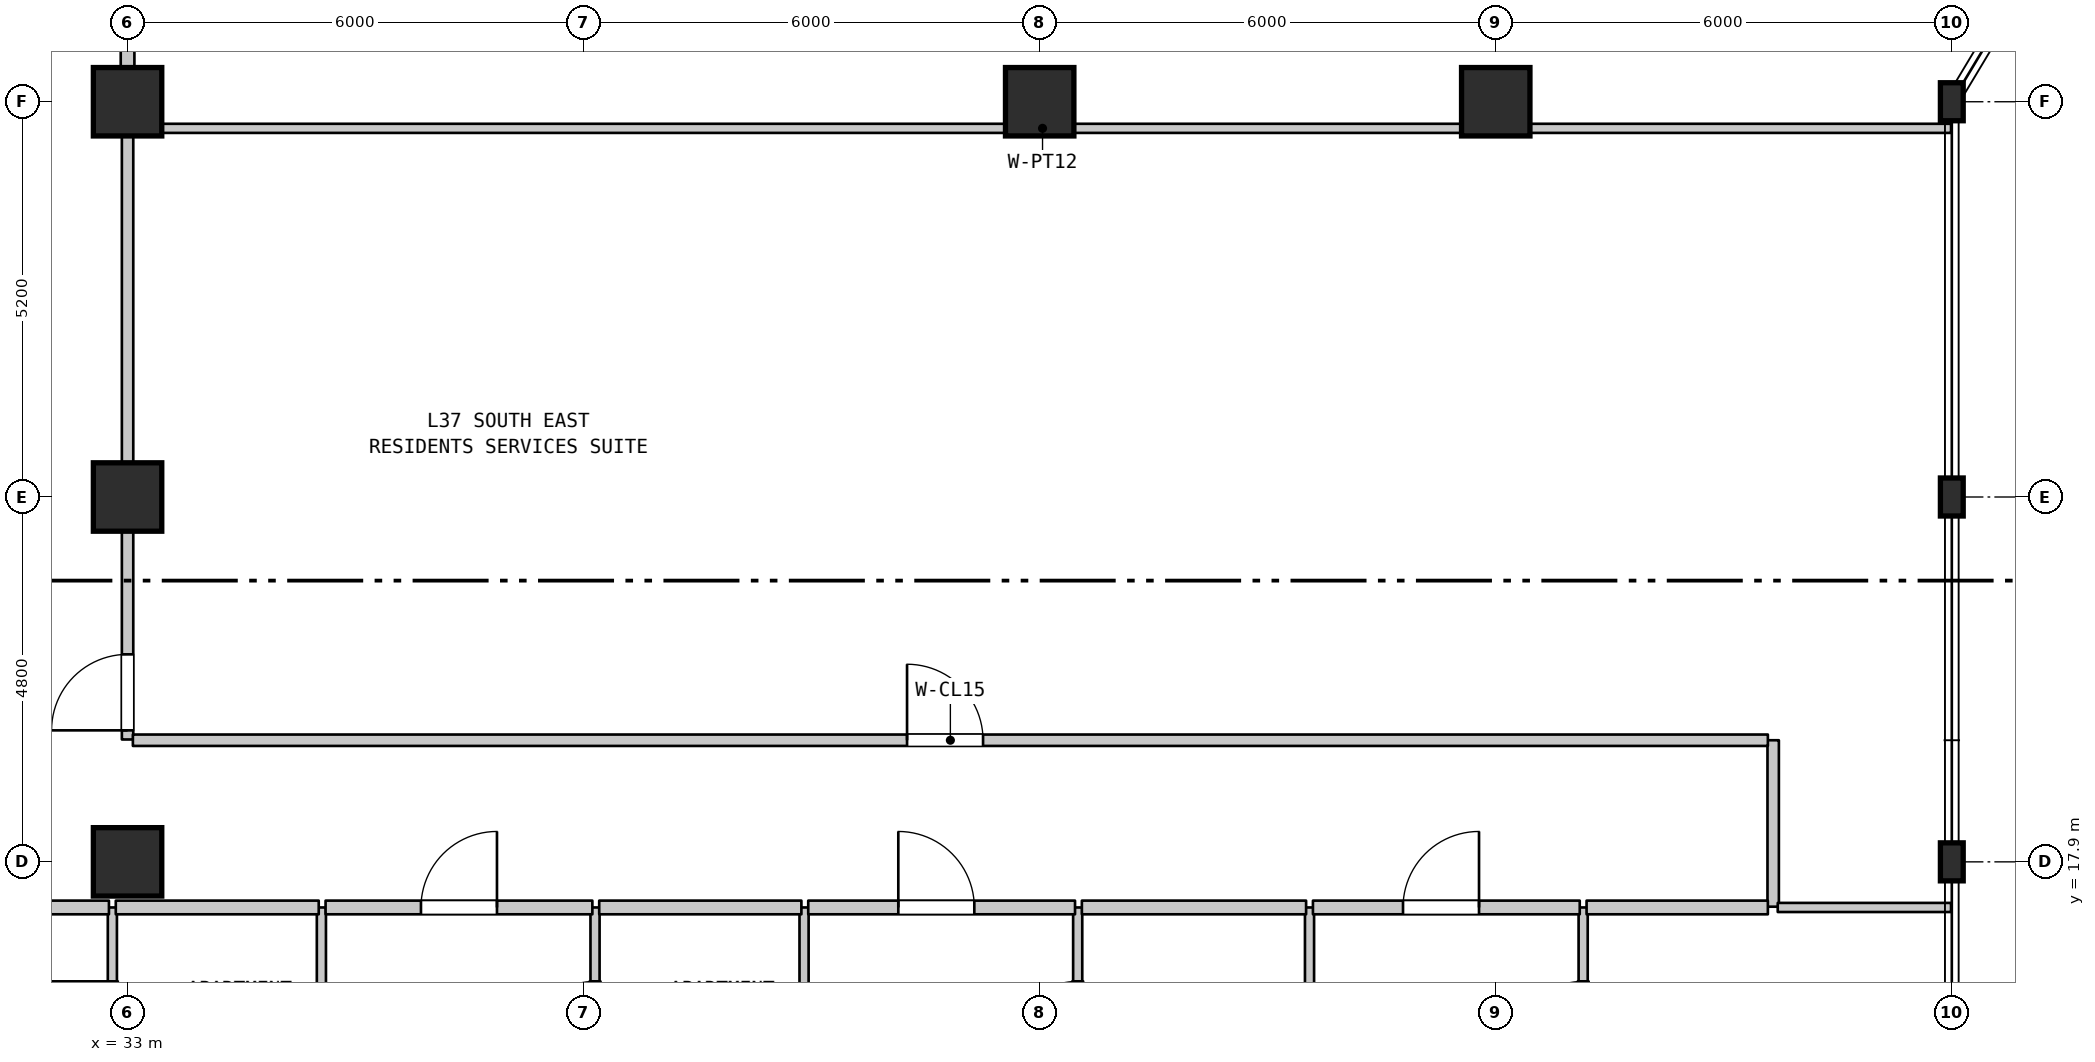
"""IFC4 building model, lengths in metres.
Left out: names, types, materials, properties, quantities, classifications, styles, units other than length and angle.
Written with IfcOpenShell. Run it as: python <this file> out.ifc"""

import sys

from ifc_helpers import new_model, si_unit, direction, frame, frame_2d, origin, origin_2d, place, context, subcontext, project, spatial, rectangle, i_section, extrude, element, fill, save


model = new_model("IFC4")
c1 = context("Model", 3, precision=1e-05, world=origin(), true_north=direction((0.0, 1.0)))
c2 = subcontext(c1, "Body", "Model", "MODEL_VIEW")
j1 = project(units=[si_unit("LENGTHUNIT", "METRE"), si_unit("PLANEANGLEUNIT", "RADIAN")], contexts=[c1])
p1 = place(None, origin())
s1 = spatial("IfcSite", under=j1, at=p1, CompositionType="ELEMENT")
p2 = place(p1, origin())
s2 = spatial("IfcBuilding", under=s1, at=p2, CompositionType="ELEMENT")
p3 = place(p2, frame((0.0, 0.0, 152.0)))
s3 = spatial("IfcBuildingStorey", under=s2, at=p3, CompositionType="ELEMENT", Elevation=152.0)
for number, where, z_axis, x_axis in (
    (1, (33.0, 17.9, 0.0), (0.0, 0.0, 1.0), (1.0, 0.0, 0.0)),
    (2, (33.0, 22.7, 0.0), (0.0, 0.0, 1.0), (1.0, 0.0, 0.0)),
    (3, (33.0, 27.9, 0.0), (0.0, 0.0, 1.0), (1.0, 0.0, 0.0)),
    (4, (45.0, 27.9, 0.0), (0.0, 0.0, 1.0), (1.0, 0.0, 0.0)),
    (5, (51.0, 27.9, 0.0), (0.0, 0.0, 1.0), (1.0, 0.0, 0.0)),
):
    element("IfcColumn", number, at=place(p3, frame(where, z_axis=z_axis, x_axis=x_axis)), inside=s3, PredefinedType="COLUMN", context=c2, shape_type="SweptSolid", body=[
        extrude(rectangle(XDim=0.9, YDim=0.9, at=origin_2d()), origin(), (0.0, 0.0, 1.0), 3.7),
    ])
for number, where, z_axis, x_axis in (
    (6, (57.0, 17.9, 0.0), (0.0, 0.0, 1.0), (1.0, 0.0, 0.0)),
    (7, (57.0, 22.7, 0.0), (0.0, 0.0, 1.0), (1.0, 0.0, 0.0)),
    (8, (57.0, 27.9, 0.0), (0.0, 0.0, 1.0), (1.0, 0.0, 0.0)),
):
    element("IfcColumn", number, at=place(p3, frame(where, z_axis=z_axis, x_axis=x_axis)), inside=s3, PredefinedType="COLUMN", context=c2, shape_type="SweptSolid", body=[
        extrude(i_section(OverallWidth=0.3, OverallDepth=0.5, WebThickness=0.014, FlangeThickness=0.028, FilletRadius=0.027, at=origin_2d()), origin(), (0.0, 0.0, 1.0), 3.7),
    ])
p4 = place(p3, frame((32.8, 14.6, 0.0), z_axis=(0.0, 0.0, 1.0), x_axis=(0.0, 1.0, 0.0)))
e9 = element("IfcWall", 9, at=p4, inside=s3, PredefinedType="PARTITIONING", context=c2, shape_type="SweptSolid", body=[
    extrude(rectangle(XDim=2.7, YDim=0.12, at=frame_2d((1.35, 0.0))), origin(), (0.0, 0.0, 1.0), 3.385),
])
p5 = place(p4, frame((0.828, 0.0, 0.0)))
e10 = element("IfcOpeningElement", 10, at=p5, cuts=e9, PredefinedType="OPENING", context=c2, shape_type="SweptSolid", body=[
    extrude(rectangle(XDim=0.9, YDim=2.1, at=frame_2d((0.45, 1.05))), frame((0.0, 0.07, 0.0), z_axis=(0.0, -1.0, 0.0), x_axis=(1.0, 0.0, 0.0)), (0.0, 0.0, 1.0), 0.14),
])
p6 = place(p3, frame((33.0, 19.51, 0.0), z_axis=(0.0, 0.0, 1.0), x_axis=(0.0, 1.0, 0.0)))
e11 = element("IfcWall", 11, at=p6, inside=s3, PredefinedType="STANDARD", context=c2, shape_type="SweptSolid", body=[
    extrude(rectangle(XDim=8.04, YDim=0.15, at=frame_2d((4.02, 0.0))), origin(), (0.0, 0.0, 1.0), 2.935),
])
p7 = place(p6, frame((0.12, 0.0, 0.0)))
e12 = element("IfcOpeningElement", 12, at=p7, cuts=e11, PredefinedType="OPENING", context=c2, shape_type="SweptSolid", body=[
    extrude(rectangle(XDim=1.0, YDim=2.15, at=frame_2d((0.5, 1.075))), frame((0.0, 0.085, 0.0), z_axis=(0.0, -1.0, 0.0), x_axis=(1.0, 0.0, 0.0)), (0.0, 0.0, 1.0), 0.17),
])
p8 = place(p3, frame((33.0, 27.56, 0.0), z_axis=(0.0, 0.0, 1.0), x_axis=(0.0, 1.0, 0.0)))
e13 = element("IfcWall", 13, at=p8, inside=s3, PredefinedType="STANDARD", context=c2, shape_type="SweptSolid", body=[
    extrude(rectangle(XDim=2.6, YDim=0.18, at=frame_2d((1.3, 0.0))), origin(), (0.0, 0.0, 1.0), 2.885),
])
p9 = place(p8, frame((1.03, 0.0, 0.0)))
e14 = element("IfcOpeningElement", 14, at=p9, cuts=e13, PredefinedType="OPENING", context=c2, shape_type="SweptSolid", body=[
    extrude(rectangle(XDim=1.0, YDim=2.15, at=frame_2d((0.5, 1.075))), frame((0.0, 0.1, 0.0), z_axis=(0.0, -1.0, 0.0), x_axis=(1.0, 0.0, 0.0)), (0.0, 0.0, 1.0), 0.2),
])
p10 = place(p3, frame((35.55, 14.6, 0.0), z_axis=(0.0, 0.0, 1.0), x_axis=(0.0, 1.0, 0.0)))
e15 = element("IfcWall", 15, at=p10, inside=s3, PredefinedType="PARTITIONING", context=c2, shape_type="SweptSolid", body=[
    extrude(rectangle(XDim=2.7, YDim=0.12, at=frame_2d((1.35, 0.0))), origin(), (0.0, 0.0, 1.0), 3.385),
])
p11 = place(p3, frame((39.15, 14.6, 0.0), z_axis=(0.0, 0.0, 1.0), x_axis=(0.0, 1.0, 0.0)))
e16 = element("IfcWall", 16, at=p11, inside=s3, PredefinedType="PARTITIONING", context=c2, shape_type="SweptSolid", body=[
    extrude(rectangle(XDim=2.7, YDim=0.12, at=frame_2d((1.35, 0.0))), origin(), (0.0, 0.0, 1.0), 3.385),
])
p12 = place(p11, frame((0.828, 0.0, 0.0)))
e17 = element("IfcOpeningElement", 17, at=p12, cuts=e16, PredefinedType="OPENING", context=c2, shape_type="SweptSolid", body=[
    extrude(rectangle(XDim=0.9, YDim=2.1, at=frame_2d((0.45, 1.05))), frame((0.0, 0.07, 0.0), z_axis=(0.0, -1.0, 0.0), x_axis=(1.0, 0.0, 0.0)), (0.0, 0.0, 1.0), 0.14),
])
p13 = place(p3, frame((41.9, 14.6, 0.0), z_axis=(0.0, 0.0, 1.0), x_axis=(0.0, 1.0, 0.0)))
e18 = element("IfcWall", 18, at=p13, inside=s3, PredefinedType="PARTITIONING", context=c2, shape_type="SweptSolid", body=[
    extrude(rectangle(XDim=2.7, YDim=0.12, at=frame_2d((1.35, 0.0))), origin(), (0.0, 0.0, 1.0), 3.385),
])
p14 = place(p3, frame((45.5, 14.6, 0.0), z_axis=(0.0, 0.0, 1.0), x_axis=(0.0, 1.0, 0.0)))
e19 = element("IfcWall", 19, at=p14, inside=s3, PredefinedType="PARTITIONING", context=c2, shape_type="SweptSolid", body=[
    extrude(rectangle(XDim=2.7, YDim=0.12, at=frame_2d((1.35, 0.0))), origin(), (0.0, 0.0, 1.0), 3.385),
])
p15 = place(p14, frame((0.828, 0.0, 0.0)))
e20 = element("IfcOpeningElement", 20, at=p15, cuts=e19, PredefinedType="OPENING", context=c2, shape_type="SweptSolid", body=[
    extrude(rectangle(XDim=0.9, YDim=2.1, at=frame_2d((0.45, 1.05))), frame((0.0, 0.07, 0.0), z_axis=(0.0, -1.0, 0.0), x_axis=(1.0, 0.0, 0.0)), (0.0, 0.0, 1.0), 0.14),
])
p16 = place(p3, frame((48.55, 14.6, 0.0), z_axis=(0.0, 0.0, 1.0), x_axis=(0.0, 1.0, 0.0)))
e21 = element("IfcWall", 21, at=p16, inside=s3, PredefinedType="PARTITIONING", context=c2, shape_type="SweptSolid", body=[
    extrude(rectangle(XDim=2.7, YDim=0.12, at=frame_2d((1.35, 0.0))), origin(), (0.0, 0.0, 1.0), 3.385),
])
p17 = place(p3, frame((52.15, 14.6, 0.0), z_axis=(0.0, 0.0, 1.0), x_axis=(0.0, 1.0, 0.0)))
e22 = element("IfcWall", 22, at=p17, inside=s3, PredefinedType="PARTITIONING", context=c2, shape_type="SweptSolid", body=[
    extrude(rectangle(XDim=2.7, YDim=0.12, at=frame_2d((1.35, 0.0))), origin(), (0.0, 0.0, 1.0), 3.385),
])
p18 = place(p17, frame((0.828, 0.0, 0.0)))
e23 = element("IfcOpeningElement", 23, at=p18, cuts=e22, PredefinedType="OPENING", context=c2, shape_type="SweptSolid", body=[
    extrude(rectangle(XDim=0.9, YDim=2.1, at=frame_2d((0.45, 1.05))), frame((0.0, 0.07, 0.0), z_axis=(0.0, -1.0, 0.0), x_axis=(1.0, 0.0, 0.0)), (0.0, 0.0, 1.0), 0.14),
])
p19 = place(p3, frame((54.65, 17.31, 0.0), z_axis=(0.0, 0.0, 1.0), x_axis=(0.0, 1.0, 0.0)))
e24 = element("IfcWall", 24, at=p19, inside=s3, PredefinedType="STANDARD", context=c2, shape_type="SweptSolid", body=[
    extrude(rectangle(XDim=2.19, YDim=0.15, at=frame_2d((1.095, 0.0))), origin(), (0.0, 0.0, 1.0), 3.385),
])
p20 = place(p3, frame((29.245, 17.3, 0.0), z_axis=(0.0, 0.0, 1.0), x_axis=(1.0, 0.0, 0.0)))
e25 = element("IfcWall", 25, at=p20, inside=s3, PredefinedType="STANDARD", context=c2, shape_type="SweptSolid", body=[
    extrude(rectangle(XDim=3.51, YDim=0.18, at=frame_2d((1.755, 0.0))), origin(), (0.0, 0.0, 1.0), 3.385),
])
p21 = place(p20, frame((1.255, 0.0, 0.0)))
e26 = element("IfcOpeningElement", 26, at=p21, cuts=e25, PredefinedType="OPENING", context=c2, shape_type="SweptSolid", body=[
    extrude(rectangle(XDim=1.0, YDim=2.15, at=frame_2d((0.5, 1.075))), frame((0.0, 0.1, 0.0), z_axis=(0.0, -1.0, 0.0), x_axis=(1.0, 0.0, 0.0)), (0.0, 0.0, 1.0), 0.2),
])
p22 = place(p3, frame((32.845, 17.3, 0.0), z_axis=(0.0, 0.0, 1.0), x_axis=(1.0, 0.0, 0.0)))
e27 = element("IfcWall", 27, at=p22, inside=s3, PredefinedType="STANDARD", context=c2, shape_type="SweptSolid", body=[
    extrude(rectangle(XDim=2.67, YDim=0.18, at=frame_2d((1.335, 0.0))), origin(), (0.0, 0.0, 1.0), 3.385),
])
p23 = place(p3, frame((35.605, 17.3, 0.0), z_axis=(0.0, 0.0, 1.0), x_axis=(1.0, 0.0, 0.0)))
e28 = element("IfcWall", 28, at=p23, inside=s3, PredefinedType="STANDARD", context=c2, shape_type="SweptSolid", body=[
    extrude(rectangle(XDim=3.51, YDim=0.18, at=frame_2d((1.755, 0.0))), origin(), (0.0, 0.0, 1.0), 3.385),
])
p24 = place(p23, frame((1.255, 0.0, 0.0)))
e29 = element("IfcOpeningElement", 29, at=p24, cuts=e28, PredefinedType="OPENING", context=c2, shape_type="SweptSolid", body=[
    extrude(rectangle(XDim=1.0, YDim=2.15, at=frame_2d((0.5, 1.075))), frame((0.0, 0.1, 0.0), z_axis=(0.0, -1.0, 0.0), x_axis=(1.0, 0.0, 0.0)), (0.0, 0.0, 1.0), 0.2),
])
p25 = place(p3, frame((39.205, 17.3, 0.0), z_axis=(0.0, 0.0, 1.0), x_axis=(1.0, 0.0, 0.0)))
e30 = element("IfcWall", 30, at=p25, inside=s3, PredefinedType="STANDARD", context=c2, shape_type="SweptSolid", body=[
    extrude(rectangle(XDim=2.66, YDim=0.18, at=frame_2d((1.33, 0.0))), origin(), (0.0, 0.0, 1.0), 3.385),
])
p26 = place(p3, frame((41.955, 17.3, 0.0), z_axis=(0.0, 0.0, 1.0), x_axis=(1.0, 0.0, 0.0)))
e31 = element("IfcWall", 31, at=p26, inside=s3, PredefinedType="STANDARD", context=c2, shape_type="SweptSolid", body=[
    extrude(rectangle(XDim=3.51, YDim=0.18, at=frame_2d((1.755, 0.0))), origin(), (0.0, 0.0, 1.0), 3.385),
])
p27 = place(p26, frame((1.185, 0.0, 0.0)))
e32 = element("IfcOpeningElement", 32, at=p27, cuts=e31, PredefinedType="OPENING", context=c2, shape_type="SweptSolid", body=[
    extrude(rectangle(XDim=1.0, YDim=2.15, at=frame_2d((0.5, 1.075))), frame((0.0, 0.1, 0.0), z_axis=(0.0, -1.0, 0.0), x_axis=(1.0, 0.0, 0.0)), (0.0, 0.0, 1.0), 0.2),
])
p28 = place(p3, frame((45.555, 17.3, 0.0), z_axis=(0.0, 0.0, 1.0), x_axis=(1.0, 0.0, 0.0)))
e33 = element("IfcWall", 33, at=p28, inside=s3, PredefinedType="STANDARD", context=c2, shape_type="SweptSolid", body=[
    extrude(rectangle(XDim=2.95, YDim=0.18, at=frame_2d((1.475, 0.0))), origin(), (0.0, 0.0, 1.0), 3.385),
])
p29 = place(p3, frame((48.595, 17.3, 0.0), z_axis=(0.0, 0.0, 1.0), x_axis=(1.0, 0.0, 0.0)))
e34 = element("IfcWall", 34, at=p29, inside=s3, PredefinedType="STANDARD", context=c2, shape_type="SweptSolid", body=[
    extrude(rectangle(XDim=3.51, YDim=0.18, at=frame_2d((1.755, 0.0))), origin(), (0.0, 0.0, 1.0), 3.385),
])
p30 = place(p29, frame((1.185, 0.0, 0.0)))
e35 = element("IfcOpeningElement", 35, at=p30, cuts=e34, PredefinedType="OPENING", context=c2, shape_type="SweptSolid", body=[
    extrude(rectangle(XDim=1.0, YDim=2.15, at=frame_2d((0.5, 1.075))), frame((0.0, 0.1, 0.0), z_axis=(0.0, -1.0, 0.0), x_axis=(1.0, 0.0, 0.0)), (0.0, 0.0, 1.0), 0.2),
])
p31 = place(p3, frame((52.195, 17.3, 0.0), z_axis=(0.0, 0.0, 1.0), x_axis=(1.0, 0.0, 0.0)))
e36 = element("IfcWall", 36, at=p31, inside=s3, PredefinedType="STANDARD", context=c2, shape_type="SweptSolid", body=[
    extrude(rectangle(XDim=2.385, YDim=0.18, at=frame_2d((1.192, 0.0))), origin(), (0.0, 0.0, 1.0), 3.385),
])
p32 = place(p3, frame((54.71, 17.3, 0.0), z_axis=(0.0, 0.0, 1.0), x_axis=(1.0, 0.0, 0.0)))
e37 = element("IfcWall", 37, at=p32, inside=s3, PredefinedType="PARTITIONING", context=c2, shape_type="SweptSolid", body=[
    extrude(rectangle(XDim=2.28, YDim=0.12, at=frame_2d((1.14, 0.0))), origin(), (0.0, 0.0, 1.0), 3.385),
])
p33 = place(p3, frame((33.07, 19.5, 0.0), z_axis=(0.0, 0.0, 1.0), x_axis=(1.0, 0.0, 0.0)))
e38 = element("IfcWall", 38, at=p33, inside=s3, PredefinedType="STANDARD", context=c2, shape_type="SweptSolid", body=[
    extrude(rectangle(XDim=21.51, YDim=0.15, at=frame_2d((10.755, 0.0))), origin(), (0.0, 0.0, 1.0), 3.385),
])
p34 = place(p33, frame((10.185, 0.0, 0.0)))
e39 = element("IfcOpeningElement", 39, at=p34, cuts=e38, PredefinedType="OPENING", context=c2, shape_type="SweptSolid", body=[
    extrude(rectangle(XDim=1.0, YDim=2.15, at=frame_2d((0.5, 1.075))), frame((0.0, 0.085, 0.0), z_axis=(0.0, -1.0, 0.0), x_axis=(1.0, 0.0, 0.0)), (0.0, 0.0, 1.0), 0.17),
])
p35 = place(p3, frame((33.085, 27.55, 0.0), z_axis=(0.0, 0.0, 1.0), x_axis=(1.0, 0.0, 0.0)))
e40 = element("IfcWall", 40, at=p35, inside=s3, PredefinedType="PARTITIONING", context=c2, shape_type="SweptSolid", body=[
    extrude(rectangle(XDim=23.905, YDim=0.12, at=frame_2d((11.953, 0.0))), origin(), (0.0, 0.0, 1.0), 3.385),
])
p36 = place(p5, origin())
e41 = element("IfcDoor", 41, at=p36, inside=s3, OperationType="SINGLE_SWING_RIGHT", PredefinedType="DOOR", context=c2, shape_type="SweptSolid", body=[
    extrude(rectangle(XDim=0.9, YDim=2.1, at=frame_2d((0.45, 1.05))), frame((0.0, 0.025, 0.0), z_axis=(0.0, -1.0, 0.0), x_axis=(1.0, 0.0, 0.0)), (0.0, 0.0, 1.0), 0.05),
])
fill(e10, e41)
p37 = place(p7, origin())
e42 = element("IfcDoor", 42, at=p37, inside=s3, OperationType="SINGLE_SWING_LEFT", PredefinedType="DOOR", context=c2, shape_type="SweptSolid", body=[
    extrude(rectangle(XDim=1.0, YDim=2.15, at=frame_2d((0.5, 1.075))), frame((0.0, 0.025, 0.0), z_axis=(0.0, -1.0, 0.0), x_axis=(1.0, 0.0, 0.0)), (0.0, 0.0, 1.0), 0.05),
])
fill(e12, e42)
p38 = place(p12, origin())
e43 = element("IfcDoor", 43, at=p38, inside=s3, OperationType="SINGLE_SWING_LEFT", PredefinedType="DOOR", context=c2, shape_type="SweptSolid", body=[
    extrude(rectangle(XDim=0.9, YDim=2.1, at=frame_2d((0.45, 1.05))), frame((0.0, 0.025, 0.0), z_axis=(0.0, -1.0, 0.0), x_axis=(1.0, 0.0, 0.0)), (0.0, 0.0, 1.0), 0.05),
])
fill(e17, e43)
p39 = place(p15, origin())
e44 = element("IfcDoor", 44, at=p39, inside=s3, OperationType="SINGLE_SWING_LEFT", PredefinedType="DOOR", context=c2, shape_type="SweptSolid", body=[
    extrude(rectangle(XDim=0.9, YDim=2.1, at=frame_2d((0.45, 1.05))), frame((0.0, 0.025, 0.0), z_axis=(0.0, -1.0, 0.0), x_axis=(1.0, 0.0, 0.0)), (0.0, 0.0, 1.0), 0.05),
])
fill(e20, e44)
p40 = place(p18, origin())
e45 = element("IfcDoor", 45, at=p40, inside=s3, OperationType="SINGLE_SWING_LEFT", PredefinedType="DOOR", context=c2, shape_type="SweptSolid", body=[
    extrude(rectangle(XDim=0.9, YDim=2.1, at=frame_2d((0.45, 1.05))), frame((0.0, 0.025, 0.0), z_axis=(0.0, -1.0, 0.0), x_axis=(1.0, 0.0, 0.0)), (0.0, 0.0, 1.0), 0.05),
])
fill(e23, e45)
p41 = place(p24, origin())
e46 = element("IfcDoor", 46, at=p41, inside=s3, OperationType="SINGLE_SWING_RIGHT", PredefinedType="DOOR", context=c2, shape_type="SweptSolid", body=[
    extrude(rectangle(XDim=1.0, YDim=2.15, at=frame_2d((0.5, 1.075))), frame((0.0, 0.025, 0.0), z_axis=(0.0, -1.0, 0.0), x_axis=(1.0, 0.0, 0.0)), (0.0, 0.0, 1.0), 0.05),
])
fill(e29, e46)
p42 = place(p27, origin())
e47 = element("IfcDoor", 47, at=p42, inside=s3, OperationType="SINGLE_SWING_LEFT", PredefinedType="DOOR", context=c2, shape_type="SweptSolid", body=[
    extrude(rectangle(XDim=1.0, YDim=2.15, at=frame_2d((0.5, 1.075))), frame((0.0, 0.025, 0.0), z_axis=(0.0, -1.0, 0.0), x_axis=(1.0, 0.0, 0.0)), (0.0, 0.0, 1.0), 0.05),
])
fill(e32, e47)
p43 = place(p30, origin())
e48 = element("IfcDoor", 48, at=p43, inside=s3, OperationType="SINGLE_SWING_RIGHT", PredefinedType="DOOR", context=c2, shape_type="SweptSolid", body=[
    extrude(rectangle(XDim=1.0, YDim=2.15, at=frame_2d((0.5, 1.075))), frame((0.0, 0.025, 0.0), z_axis=(0.0, -1.0, 0.0), x_axis=(1.0, 0.0, 0.0)), (0.0, 0.0, 1.0), 0.05),
])
fill(e35, e48)
p44 = place(p34, origin())
e49 = element("IfcDoor", 49, at=p44, inside=s3, OperationType="SINGLE_SWING_LEFT", PredefinedType="DOOR", context=c2, shape_type="SweptSolid", body=[
    extrude(rectangle(XDim=1.0, YDim=2.15, at=frame_2d((0.5, 1.075))), frame((0.0, 0.025, 0.0), z_axis=(0.0, -1.0, 0.0), x_axis=(1.0, 0.0, 0.0)), (0.0, 0.0, 1.0), 0.05),
])
fill(e39, e49)
save(model, sys.argv[1])
